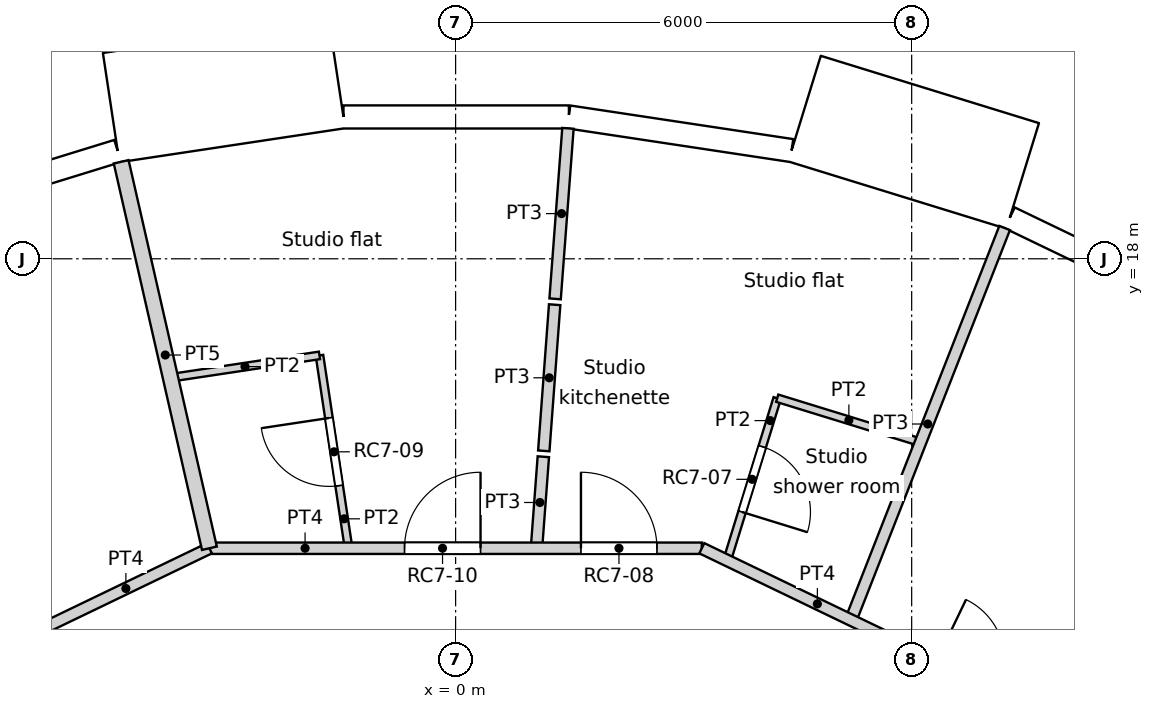
"""IFC4 building model, lengths in metres.
Left out: names, types, materials, properties, quantities, classifications, styles, units other than length and angle.
Written with IfcOpenShell. Run it as: python <this file> out.ifc"""

import sys

from ifc_helpers import new_model, si_unit, direction, frame, frame_2d, origin, origin_2d, place, context, subcontext, project, spatial, rectangle, circle, extrude, element, fill, save


model = new_model("IFC4")
c1 = context("Model", 3, precision=1e-05, world=origin(), true_north=direction((0.0, 1.0)))
c2 = subcontext(c1, "Body", "Model", "MODEL_VIEW")
j1 = project(units=[si_unit("LENGTHUNIT", "METRE"), si_unit("PLANEANGLEUNIT", "RADIAN")], contexts=[c1])
p1 = place(None, origin())
s1 = spatial("IfcSite", under=j1, at=p1, CompositionType="ELEMENT")
p2 = place(p1, origin())
s2 = spatial("IfcBuilding", under=s1, at=p2, CompositionType="ELEMENT")
p3 = place(p2, frame((0.0, 0.0, 294.6)))
s3 = spatial("IfcBuildingStorey", under=s2, at=p3, CompositionType="ELEMENT", Elevation=294.6)
for number, where, z_axis, x_axis in (
    (1, (6.876, 17.521, 0.0), (0.0, 0.0, 1.0), (1.0, 0.0, 0.0)),
    (2, (1.406, 18.77, 0.0), (0.0, 0.0, 1.0), (1.0, 0.0, 0.0)),
    (3, (-4.188, 18.35, 0.0), (0.0, 0.0, 1.0), (1.0, 0.0, 0.0)),
):
    element("IfcColumn", number, at=place(p3, frame(where, z_axis=z_axis, x_axis=x_axis)), inside=s3, PredefinedType="COLUMN", context=c2, shape_type="SweptSolid", body=[
        extrude(circle(Radius=0.45, at=origin_2d()), origin(), (0.0, 0.0, 1.0), 3.6),
    ])
p4 = place(p3, frame((9.961, 17.253, 0.0), z_axis=(0.0, 0.0, 1.0), x_axis=(-0.90095513435, 0.433912255978, 0.0)))
e4 = element("IfcWall", 4, at=p4, inside=s3, PredefinedType="SOLIDWALL", context=c2, shape_type="SweptSolid", body=[
    extrude(rectangle(XDim=2.962, YDim=0.3, at=frame_2d((1.481, 0.0))), origin(), (0.0, 0.0, 1.0), 3.25),
])
p5 = place(p4, frame((1.481, 0.0, 1.55)))
e5 = element("IfcOpeningElement", 5, at=p5, cuts=e4, PredefinedType="OPENING", context=c2, shape_type="SweptSolid", body=[
    extrude(circle(Radius=0.9, at=origin_2d()), frame((0.0, 0.16, 0.0), z_axis=(0.0, -1.0, 0.0), x_axis=(1.0, 0.0, 0.0)), (0.0, 0.0, 1.0), 0.32),
])
p6 = place(p3, frame((7.458, 19.091, -0.35), z_axis=(0.0, 0.0, 1.0), x_axis=(-0.955571139978, 0.294760574774, 0.0)))
e6 = element("IfcWall", 6, at=p6, inside=s3, PredefinedType="ELEMENTEDWALL", context=c2, shape_type="SweptSolid", body=[
    extrude(rectangle(XDim=3.0, YDim=1.45, at=frame_2d((1.5, 0.0))), origin(), (0.0, 0.0, 1.0), 3.6),
])
p7 = place(p6, frame((1.5, 0.0, 1.9)))
e7 = element("IfcOpeningElement", 7, at=p7, cuts=e6, PredefinedType="OPENING", context=c2, shape_type="SweptSolid", body=[
    extrude(circle(Radius=0.9, at=origin_2d()), frame((0.0, 0.735, 0.0), z_axis=(0.0, -1.0, 0.0), x_axis=(1.0, 0.0, 0.0)), (0.0, 0.0, 1.0), 1.47),
])
p8 = place(p3, frame((4.418, 19.425, 0.0), z_axis=(0.0, 0.0, 1.0), x_axis=(-0.988835775663, 0.149009425104, 0.0)))
e8 = element("IfcWall", 8, at=p8, inside=s3, PredefinedType="SOLIDWALL", context=c2, shape_type="SweptSolid", body=[
    extrude(rectangle(XDim=2.962, YDim=0.3, at=frame_2d((1.481, 0.0))), origin(), (0.0, 0.0, 1.0), 3.25),
])
p9 = place(p8, frame((1.481, 0.0, 1.55)))
e9 = element("IfcOpeningElement", 9, at=p9, cuts=e8, PredefinedType="OPENING", context=c2, shape_type="SweptSolid", body=[
    extrude(circle(Radius=0.9, at=origin_2d()), frame((0.0, 0.16, 0.0), z_axis=(0.0, -1.0, 0.0), x_axis=(1.0, 0.0, 0.0)), (0.0, 0.0, 1.0), 0.32),
])
p10 = place(p3, frame((1.489, 19.866, 0.0), z_axis=(0.0, 0.0, 1.0), x_axis=(-1.0, 0.0, 0.0)))
e10 = element("IfcWall", 10, at=p10, inside=s3, PredefinedType="SOLIDWALL", context=c2, shape_type="SweptSolid", body=[
    extrude(rectangle(XDim=2.962, YDim=0.3, at=frame_2d((1.481, 0.0))), origin(), (0.0, 0.0, 1.0), 3.25),
])
p11 = place(p10, frame((1.481, 0.0, 1.55)))
e11 = element("IfcOpeningElement", 11, at=p11, cuts=e10, PredefinedType="OPENING", context=c2, shape_type="SweptSolid", body=[
    extrude(circle(Radius=0.9, at=origin_2d()), frame((0.0, 0.16, 0.0), z_axis=(0.0, -1.0, 0.0), x_axis=(1.0, 0.0, 0.0)), (0.0, 0.0, 1.0), 0.32),
])
p12 = place(p3, frame((-1.563, 20.436, -0.35), z_axis=(0.0, 0.0, 1.0), x_axis=(-0.988836445254, -0.149004981587, 0.0)))
e12 = element("IfcWall", 12, at=p12, inside=s3, PredefinedType="ELEMENTEDWALL", context=c2, shape_type="SweptSolid", body=[
    extrude(rectangle(XDim=3.0, YDim=1.45, at=frame_2d((1.5, 0.0))), origin(), (0.0, 0.0, 1.0), 3.6),
])
p13 = place(p12, frame((1.5, 0.0, 1.9)))
e13 = element("IfcOpeningElement", 13, at=p13, cuts=e12, PredefinedType="OPENING", context=c2, shape_type="SweptSolid", body=[
    extrude(circle(Radius=0.9, at=origin_2d()), frame((0.0, 0.735, 0.0), z_axis=(0.0, -1.0, 0.0), x_axis=(1.0, 0.0, 0.0)), (0.0, 0.0, 1.0), 1.47),
])
p14 = place(p3, frame((-4.448, 19.418, 0.0), z_axis=(0.0, 0.0, 1.0), x_axis=(-0.95558635705, -0.294711238707, 0.0)))
e14 = element("IfcWall", 14, at=p14, inside=s3, PredefinedType="SOLIDWALL", context=c2, shape_type="SweptSolid", body=[
    extrude(rectangle(XDim=2.962, YDim=0.3, at=frame_2d((1.481, 0.0))), origin(), (0.0, 0.0, 1.0), 3.25),
])
p15 = place(p14, frame((1.481, 0.0, 1.55)))
e15 = element("IfcOpeningElement", 15, at=p15, cuts=e14, PredefinedType="OPENING", context=c2, shape_type="SweptSolid", body=[
    extrude(circle(Radius=0.9, at=origin_2d()), frame((0.0, 0.16, 0.0), z_axis=(0.0, -1.0, 0.0), x_axis=(1.0, 0.0, 0.0)), (0.0, 0.0, 1.0), 0.32),
])
p16 = place(p3, frame((3.239, 14.192, 0.0), z_axis=(0.0, 0.0, 1.0), x_axis=(0.900976027191, -0.433868872388, 0.0)))
e16 = element("IfcWall", 16, at=p16, inside=s3, PredefinedType="PARTITIONING", context=c2, shape_type="SweptSolid", body=[
    extrude(rectangle(XDim=6.479, YDim=0.15, at=frame_2d((3.239, 0.0))), origin(), (0.0, 0.0, 1.0), 3.25),
])
p17 = place(p16, frame((3.425, 0.0, 0.0)))
e17 = element("IfcOpeningElement", 17, at=p17, cuts=e16, PredefinedType="OPENING", context=c2, shape_type="SweptSolid", body=[
    extrude(rectangle(XDim=1.8, YDim=2.1, at=frame_2d((0.9, 1.05))), frame((0.0, 0.075, 0.0), z_axis=(0.0, -1.0, 0.0), x_axis=(1.0, 0.0, 0.0)), (0.0, 0.0, 1.0), 0.15),
])
p18 = place(p3, frame((-3.239, 14.192, 0.0), z_axis=(0.0, 0.0, 1.0), x_axis=(1.0, 0.0, 0.0)))
e18 = element("IfcWall", 18, at=p18, inside=s3, PredefinedType="PARTITIONING", context=c2, shape_type="SweptSolid", body=[
    extrude(rectangle(XDim=6.478, YDim=0.15, at=frame_2d((3.239, 0.0))), origin(), (0.0, 0.0, 1.0), 3.25),
])
p19 = place(p18, frame((4.888, 0.0, 0.0)))
e19 = element("IfcOpeningElement", 19, at=p19, cuts=e18, PredefinedType="OPENING", context=c2, shape_type="SweptSolid", body=[
    extrude(rectangle(XDim=1.0, YDim=2.1, at=frame_2d((0.5, 1.05))), frame((0.0, 0.075, 0.0), z_axis=(0.0, -1.0, 0.0), x_axis=(1.0, 0.0, 0.0)), (0.0, 0.0, 1.0), 0.15),
])
p20 = place(p18, frame((2.567, 0.0, 0.0)))
e20 = element("IfcOpeningElement", 20, at=p20, cuts=e18, PredefinedType="OPENING", context=c2, shape_type="SweptSolid", body=[
    extrude(rectangle(XDim=1.0, YDim=2.1, at=frame_2d((0.5, 1.05))), frame((0.0, 0.075, 0.0), z_axis=(0.0, -1.0, 0.0), x_axis=(1.0, 0.0, 0.0)), (0.0, 0.0, 1.0), 0.15),
])
p21 = place(p3, frame((-9.076, 11.381, 0.0), z_axis=(0.0, 0.0, 1.0), x_axis=(0.900976027191, 0.433868872388, 0.0)))
e21 = element("IfcWall", 21, at=p21, inside=s3, PredefinedType="PARTITIONING", context=c2, shape_type="SweptSolid", body=[
    extrude(rectangle(XDim=6.479, YDim=0.15, at=frame_2d((3.239, 0.0))), origin(), (0.0, 0.0, 1.0), 3.25),
])
p22 = place(p21, frame((2.489, 0.0, 0.0)))
e22 = element("IfcOpeningElement", 22, at=p22, cuts=e21, PredefinedType="OPENING", context=c2, shape_type="SweptSolid", body=[
    extrude(rectangle(XDim=1.5, YDim=2.1, at=frame_2d((0.75, 1.05))), frame((0.0, 0.075, 0.0), z_axis=(0.0, -1.0, 0.0), x_axis=(1.0, 0.0, 0.0)), (0.0, 0.0, 1.0), 0.15),
])
p23 = place(p3, frame((5.2, 13.248, 0.0), z_axis=(0.0, 0.0, 1.0), x_axis=(0.365205108582, 0.930927080209, 0.0)))
e23 = element("IfcWall", 23, at=p23, inside=s3, PredefinedType="PARTITIONING", context=c2, shape_type="SweptSolid", body=[
    extrude(rectangle(XDim=5.54, YDim=0.15, at=frame_2d((2.77, 0.0))), origin(), (0.0, 0.0, 1.0), 3.25),
])
p24 = place(p3, frame((4.231, 16.166, 0.0), z_axis=(0.0, 0.0, 1.0), x_axis=(0.955671951668, -0.294433559219, 0.0)))
e24 = element("IfcWall", 24, at=p24, inside=s3, PredefinedType="PARTITIONING", context=c2, shape_type="SweptSolid", body=[
    extrude(rectangle(XDim=1.973, YDim=0.1, at=frame_2d((0.987, 0.0))), origin(), (0.0, 0.0, 1.0), 3.25),
])
p25 = place(p3, frame((3.572, 14.032, 0.0), z_axis=(0.0, 0.0, 1.0), x_axis=(0.295030507093, 0.955487833457, 0.0)))
e25 = element("IfcWall", 25, at=p25, inside=s3, PredefinedType="PARTITIONING", context=c2, shape_type="SweptSolid", body=[
    extrude(rectangle(XDim=2.233, YDim=0.1, at=frame_2d((1.117, 0.0))), origin(), (0.0, 0.0, 1.0), 3.25),
])
p26 = place(p25, frame((0.667, 0.0, 0.0)))
e26 = element("IfcOpeningElement", 26, at=p26, cuts=e25, PredefinedType="OPENING", context=c2, shape_type="SweptSolid", body=[
    extrude(rectangle(XDim=0.9, YDim=2.04, at=frame_2d((0.45, 1.02))), frame((0.0, 0.05, 0.0), z_axis=(0.0, -1.0, 0.0), x_axis=(1.0, 0.0, 0.0)), (0.0, 0.0, 1.0), 0.1),
])
p27 = place(p3, frame((1.064, 14.192, 0.0), z_axis=(0.0, 0.0, 1.0), x_axis=(0.074608991733, 0.997212865116, 0.0)))
e27 = element("IfcWall", 27, at=p27, inside=s3, PredefinedType="PARTITIONING", context=c2, shape_type="SweptSolid", body=[
    extrude(rectangle(XDim=1.208, YDim=0.15, at=frame_2d((0.604, 0.0))), origin(), (0.0, 0.0, 1.0), 3.25),
])
p28 = place(p3, frame((1.309, 17.473, 0.0), z_axis=(0.0, 0.0, 1.0), x_axis=(0.075102921739, 0.997175787485, 0.0)))
e28 = element("IfcWall", 28, at=p28, inside=s3, PredefinedType="PARTITIONING", context=c2, shape_type="SweptSolid", body=[
    extrude(rectangle(XDim=2.25, YDim=0.15, at=frame_2d((1.125, 0.0))), origin(), (0.0, 0.0, 1.0), 3.25),
])
p29 = place(p3, frame((1.16, 15.473, 0.0), z_axis=(0.0, 0.0, 1.0), x_axis=(0.074188791375, 0.99724421444, 0.0)))
e29 = element("IfcWall", 29, at=p29, inside=s3, PredefinedType="PARTITIONING", context=c2, shape_type="SweptSolid", body=[
    extrude(rectangle(XDim=1.928, YDim=0.15, at=frame_2d((0.964, 0.0))), origin(), (0.0, 0.0, 1.0), 3.25),
])
p30 = place(p3, frame((-1.791, 16.729, 0.0), z_axis=(0.0, 0.0, 1.0), x_axis=(0.149289553133, -0.988793522089, 0.0)))
e30 = element("IfcWall", 30, at=p30, inside=s3, PredefinedType="PARTITIONING", context=c2, shape_type="SweptSolid", body=[
    extrude(rectangle(XDim=2.566, YDim=0.1, at=frame_2d((1.283, 0.0))), origin(), (0.0, 0.0, 1.0), 3.25),
])
p31 = place(p30, frame((0.833, 0.0, 0.0)))
e31 = element("IfcOpeningElement", 31, at=p31, cuts=e30, PredefinedType="OPENING", context=c2, shape_type="SweptSolid", body=[
    extrude(rectangle(XDim=0.9, YDim=2.04, at=frame_2d((0.45, 1.02))), frame((0.0, 0.05, 0.0), z_axis=(0.0, -1.0, 0.0), x_axis=(1.0, 0.0, 0.0)), (0.0, 0.0, 1.0), 0.1),
])
p32 = place(p3, frame((-3.751, 16.434, 0.0), z_axis=(0.0, 0.0, 1.0), x_axis=(0.988867580828, 0.148798210967, 0.0)))
e32 = element("IfcWall", 32, at=p32, inside=s3, PredefinedType="PARTITIONING", context=c2, shape_type="SweptSolid", body=[
    extrude(rectangle(XDim=1.982, YDim=0.1, at=frame_2d((0.991, 0.0))), origin(), (0.0, 0.0, 1.0), 3.25),
])
p33 = place(p3, frame((-4.4, 19.276, 0.0), z_axis=(0.0, 0.0, 1.0), x_axis=(0.222612505682, -0.974907007008, 0.0)))
e33 = element("IfcWall", 33, at=p33, inside=s3, PredefinedType="PARTITIONING", context=c2, shape_type="SweptSolid", body=[
    extrude(rectangle(XDim=5.215, YDim=0.2, at=frame_2d((2.607, 0.0))), origin(), (0.0, 0.0, 1.0), 3.25),
])
p34 = place(p5, origin())
e34 = element("IfcWindow", 34, at=p34, inside=s3, PartitioningType="SINGLE_PANEL", PredefinedType="WINDOW", context=c2, shape_type="SweptSolid", body=[
    extrude(circle(Radius=0.9, at=origin_2d()), frame((0.0, 0.12, 0.0), z_axis=(0.0, -1.0, 0.0), x_axis=(1.0, 0.0, 0.0)), (0.0, 0.0, 1.0), 0.1),
])
fill(e5, e34)
p35 = place(p7, origin())
e35 = element("IfcWindow", 35, at=p35, inside=s3, PartitioningType="SINGLE_PANEL", PredefinedType="WINDOW", context=c2, shape_type="SweptSolid", body=[
    extrude(circle(Radius=0.9, at=origin_2d()), frame((0.0, 0.695, 0.0), z_axis=(0.0, -1.0, 0.0), x_axis=(1.0, 0.0, 0.0)), (0.0, 0.0, 1.0), 0.1),
])
fill(e7, e35)
p36 = place(p9, origin())
e36 = element("IfcWindow", 36, at=p36, inside=s3, PartitioningType="SINGLE_PANEL", PredefinedType="WINDOW", context=c2, shape_type="SweptSolid", body=[
    extrude(circle(Radius=0.9, at=origin_2d()), frame((0.0, 0.12, 0.0), z_axis=(0.0, -1.0, 0.0), x_axis=(1.0, 0.0, 0.0)), (0.0, 0.0, 1.0), 0.1),
])
fill(e9, e36)
p37 = place(p11, origin())
e37 = element("IfcWindow", 37, at=p37, inside=s3, PartitioningType="SINGLE_PANEL", PredefinedType="WINDOW", context=c2, shape_type="SweptSolid", body=[
    extrude(circle(Radius=0.9, at=origin_2d()), frame((0.0, 0.12, 0.0), z_axis=(0.0, -1.0, 0.0), x_axis=(1.0, 0.0, 0.0)), (0.0, 0.0, 1.0), 0.1),
])
fill(e11, e37)
p38 = place(p13, origin())
e38 = element("IfcWindow", 38, at=p38, inside=s3, PartitioningType="SINGLE_PANEL", PredefinedType="WINDOW", context=c2, shape_type="SweptSolid", body=[
    extrude(circle(Radius=0.9, at=origin_2d()), frame((0.0, 0.695, 0.0), z_axis=(0.0, -1.0, 0.0), x_axis=(1.0, 0.0, 0.0)), (0.0, 0.0, 1.0), 0.1),
])
fill(e13, e38)
p39 = place(p15, origin())
e39 = element("IfcWindow", 39, at=p39, inside=s3, PartitioningType="SINGLE_PANEL", PredefinedType="WINDOW", context=c2, shape_type="SweptSolid", body=[
    extrude(circle(Radius=0.9, at=origin_2d()), frame((0.0, 0.12, 0.0), z_axis=(0.0, -1.0, 0.0), x_axis=(1.0, 0.0, 0.0)), (0.0, 0.0, 1.0), 0.1),
])
fill(e15, e39)
p40 = place(p26, origin())
e40 = element("IfcDoor", 40, at=p40, inside=s3, OperationType="SINGLE_SWING_RIGHT", PredefinedType="DOOR", context=c2, shape_type="SweptSolid", body=[
    extrude(rectangle(XDim=0.9, YDim=2.04, at=frame_2d((0.45, 1.02))), frame((0.0, 0.025, 0.0), z_axis=(0.0, -1.0, 0.0), x_axis=(1.0, 0.0, 0.0)), (0.0, 0.0, 1.0), 0.05),
])
fill(e26, e40)
p41 = place(p19, origin())
e41 = element("IfcDoor", 41, at=p41, inside=s3, OperationType="SINGLE_SWING_LEFT", PredefinedType="DOOR", context=c2, shape_type="SweptSolid", body=[
    extrude(rectangle(XDim=1.0, YDim=2.1, at=frame_2d((0.5, 1.05))), frame((0.0, 0.025, 0.0), z_axis=(0.0, -1.0, 0.0), x_axis=(1.0, 0.0, 0.0)), (0.0, 0.0, 1.0), 0.05),
])
fill(e19, e41)
p42 = place(p31, origin())
e42 = element("IfcDoor", 42, at=p42, inside=s3, OperationType="SINGLE_SWING_RIGHT", PredefinedType="DOOR", context=c2, shape_type="SweptSolid", body=[
    extrude(rectangle(XDim=0.9, YDim=2.04, at=frame_2d((0.45, 1.02))), frame((0.0, 0.025, 0.0), z_axis=(0.0, -1.0, 0.0), x_axis=(1.0, 0.0, 0.0)), (0.0, 0.0, 1.0), 0.05),
])
fill(e31, e42)
p43 = place(p20, origin())
e43 = element("IfcDoor", 43, at=p43, inside=s3, OperationType="SINGLE_SWING_RIGHT", PredefinedType="DOOR", context=c2, shape_type="SweptSolid", body=[
    extrude(rectangle(XDim=1.0, YDim=2.1, at=frame_2d((0.5, 1.05))), frame((0.0, 0.025, 0.0), z_axis=(0.0, -1.0, 0.0), x_axis=(1.0, 0.0, 0.0)), (0.0, 0.0, 1.0), 0.05),
])
fill(e20, e43)
save(model, sys.argv[1])
